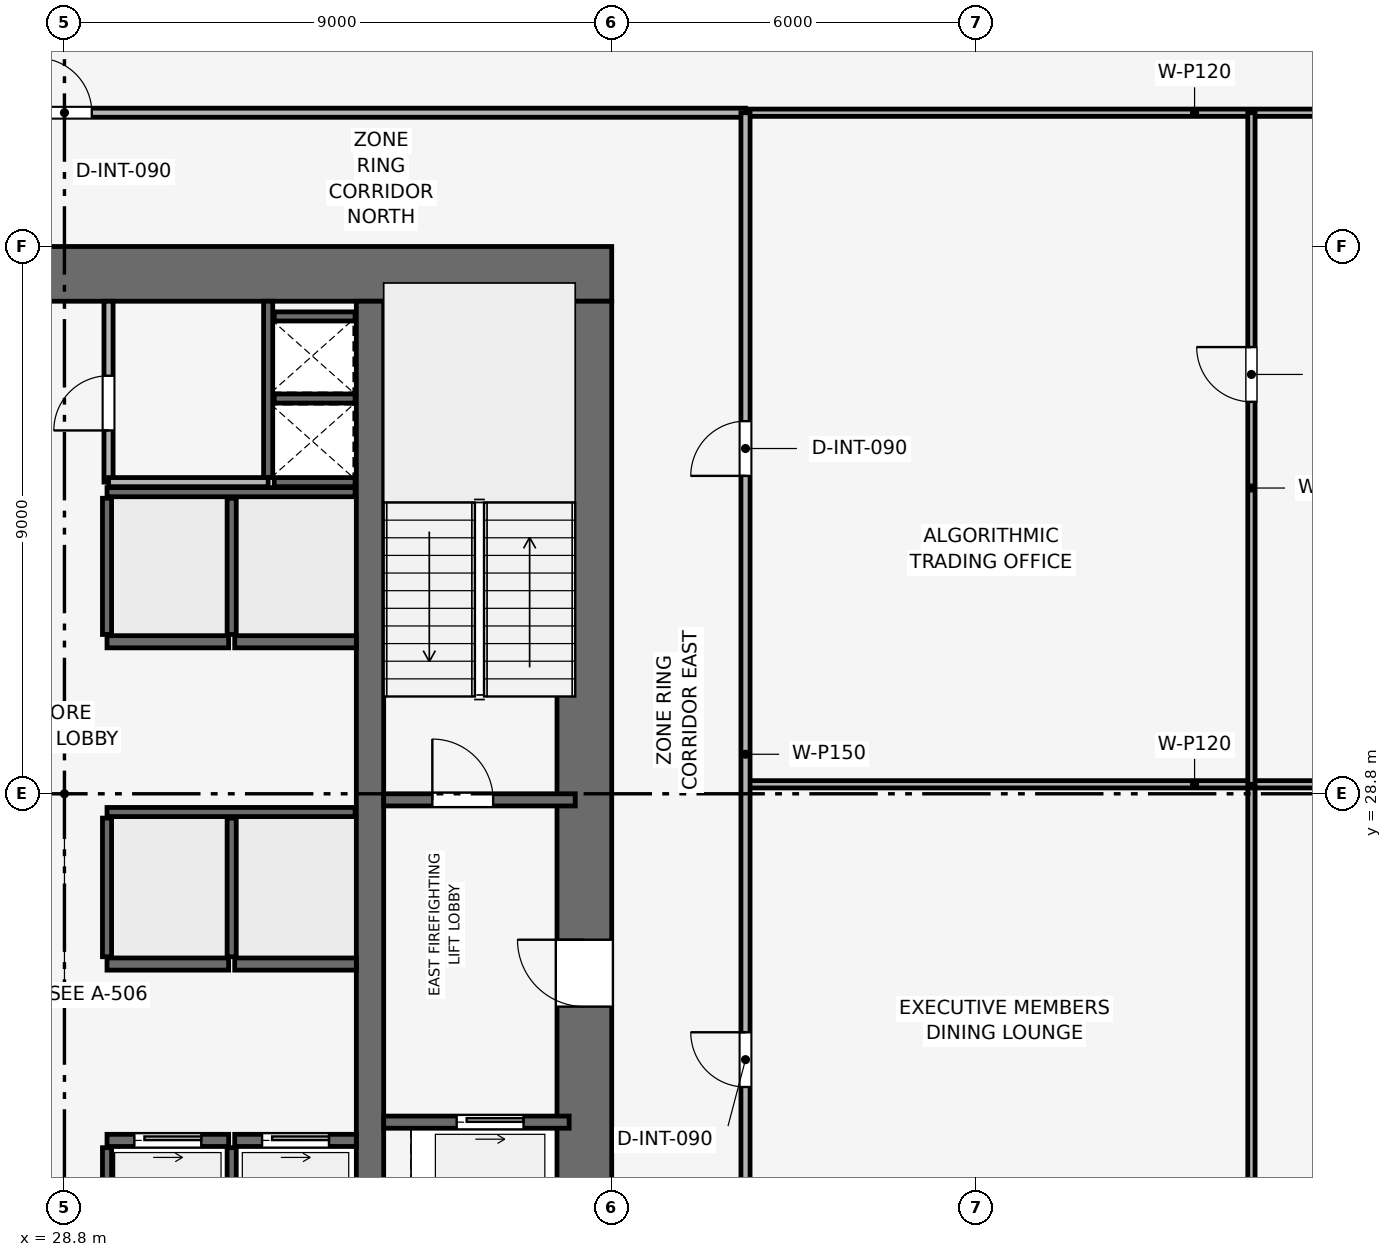
"""IFC4 building model, lengths in metres.
Left out: names, types, materials, properties, quantities, classifications, styles, units other than length and angle.
Written with IfcOpenShell. Run it as: python <this file> out.ifc"""

import sys

from ifc_helpers import new_model, si_unit, direction, frame, frame_2d, origin, place, context, subcontext, project, spatial, rectangle, extrude, element, fill, save


model = new_model("IFC4")
c1 = context("Model", 3, precision=1e-05, world=origin(), true_north=direction((0.0, 1.0)))
c2 = subcontext(c1, "Body", "Model", "MODEL_VIEW")
j1 = project(units=[si_unit("LENGTHUNIT", "METRE"), si_unit("PLANEANGLEUNIT", "RADIAN")], contexts=[c1])
p1 = place(None, origin())
s1 = spatial("IfcSite", under=j1, at=p1, CompositionType="ELEMENT")
p2 = place(p1, origin())
s2 = spatial("IfcBuilding", under=s1, at=p2, CompositionType="ELEMENT")
p3 = place(p2, frame((0.0, 0.0, 121.2)))
s3 = spatial("IfcBuildingStorey", under=s2, at=p3, CompositionType="ELEMENT", Elevation=121.2)
p4 = place(p3, frame((19.8, 37.35, 0.0), z_axis=(0.0, 0.0, 1.0), x_axis=(1.0, 0.0, 0.0)))
e1 = element("IfcWall", 1, at=p4, inside=s3, PredefinedType="SHEAR", context=c2, shape_type="SweptSolid", body=[
    extrude(rectangle(XDim=18.0, YDim=0.9, at=frame_2d((9.0, 0.0))), origin(), (0.0, 0.0, 1.0), 3.9),
])
p5 = place(p4, frame((7.05, 0.0, 0.0)))
e2 = element("IfcOpeningElement", 2, at=p5, cuts=e1, PredefinedType="OPENING", context=c2, shape_type="SweptSolid", body=[
    extrude(rectangle(XDim=1.1, YDim=2.15, at=frame_2d((0.55, 1.075))), frame((0.0, 0.46, 0.0), z_axis=(0.0, -1.0, 0.0), x_axis=(1.0, 0.0, 0.0)), (0.0, 0.0, 1.0), 0.92),
])
p6 = place(p3, frame((37.35, 20.7, 0.0), z_axis=(0.0, 0.0, 1.0), x_axis=(0.0, 1.0, 0.0)))
e3 = element("IfcWall", 3, at=p6, inside=s3, PredefinedType="SHEAR", context=c2, shape_type="SweptSolid", body=[
    extrude(rectangle(XDim=16.2, YDim=0.9, at=frame_2d((8.1, 0.0))), origin(), (0.0, 0.0, 1.0), 3.9),
])
p7 = place(p6, frame((4.6, 0.0, 0.0)))
e4 = element("IfcOpeningElement", 4, at=p7, cuts=e3, PredefinedType="OPENING", context=c2, shape_type="SweptSolid", body=[
    extrude(rectangle(XDim=1.1, YDim=2.15, at=frame_2d((0.55, 1.075))), frame((0.0, 0.46, 0.0), z_axis=(0.0, -1.0, 0.0), x_axis=(1.0, 0.0, 0.0)), (0.0, 0.0, 1.0), 0.92),
])
p8 = place(p3, frame((33.825, 20.7, 0.0), z_axis=(0.0, 0.0, 1.0), x_axis=(0.0, 1.0, 0.0)))
e5 = element("IfcWall", 5, at=p8, inside=s3, PredefinedType="SHEAR", context=c2, shape_type="SweptSolid", body=[
    extrude(rectangle(XDim=16.2, YDim=0.45, at=frame_2d((8.1, 0.0))), origin(), (0.0, 0.0, 1.0), 3.9),
])
p9 = place(p3, frame((34.05, 28.7, 0.0), z_axis=(0.0, 0.0, 1.0), x_axis=(1.0, 0.0, 0.0)))
e6 = element("IfcWall", 6, at=p9, inside=s3, PredefinedType="SHEAR", context=c2, shape_type="SweptSolid", body=[
    extrude(rectangle(XDim=3.15, YDim=0.2, at=frame_2d((1.575, 0.0))), origin(), (0.0, 0.0, 1.0), 3.65),
])
p10 = place(p9, frame((0.8, 0.0, 0.0)))
e7 = element("IfcOpeningElement", 7, at=p10, cuts=e6, PredefinedType="OPENING", context=c2, shape_type="SweptSolid", body=[
    extrude(rectangle(XDim=1.0, YDim=2.1, at=frame_2d((0.5, 1.05))), frame((0.0, 0.11, 0.0), z_axis=(0.0, -1.0, 0.0), x_axis=(1.0, 0.0, 0.0)), (0.0, 0.0, 1.0), 0.22),
])
p11 = place(p3, frame((32.15, 34.0, 0.0), z_axis=(0.0, 0.0, 1.0), x_axis=(0.0, 1.0, 0.0)))
e8 = element("IfcWall", 8, at=p11, inside=s3, PredefinedType="SHEAR", context=c2, shape_type="SweptSolid", body=[
    extrude(rectangle(XDim=2.9, YDim=0.15, at=frame_2d((1.45, 0.0))), origin(), (0.0, 0.0, 1.0), 3.65),
])
for number, where, z_axis, x_axis in (
    (9, (32.25, 33.925, 0.0), (0.0, 0.0, 1.0), (1.0, 0.0, 0.0)),
    (10, (32.25, 35.3, 0.0), (0.0, 0.0, 1.0), (1.0, 0.0, 0.0)),
):
    element("IfcWall", number, at=place(p3, frame(where, z_axis=z_axis, x_axis=x_axis)), inside=s3, PredefinedType="SHEAR", context=c2, shape_type="SweptSolid", body=[
        extrude(rectangle(XDim=1.33, YDim=0.15, at=frame_2d((0.665, 0.0))), origin(), (0.0, 0.0, 1.0), 3.65),
    ])
p12 = place(p3, frame((34.05, 23.4, 0.0), z_axis=(0.0, 0.0, 1.0), x_axis=(1.0, 0.0, 0.0)))
e11 = element("IfcWall", 11, at=p12, inside=s3, PredefinedType="SHEAR", context=c2, shape_type="SweptSolid", body=[
    extrude(rectangle(XDim=3.05, YDim=0.2, at=frame_2d((1.525, 0.0))), origin(), (0.0, 0.0, 1.0), 3.65),
])
p13 = place(p12, frame((1.2, 0.0, 0.0)))
e12 = element("IfcOpeningElement", 12, at=p13, cuts=e11, PredefinedType="OPENING", context=c2, shape_type="SweptSolid", body=[
    extrude(rectangle(XDim=1.1, YDim=2.15, at=frame_2d((0.55, 1.075))), frame((0.0, 0.11, 0.0), z_axis=(0.0, -1.0, 0.0), x_axis=(1.0, 0.0, 0.0)), (0.0, 0.0, 1.0), 0.22),
])
p14 = place(p3, frame((29.5, 23.1, 0.0), z_axis=(0.0, 0.0, 1.0), x_axis=(1.0, 0.0, 0.0)))
e13 = element("IfcWall", 13, at=p14, inside=s3, PredefinedType="SHEAR", context=c2, shape_type="SweptSolid", body=[
    extrude(rectangle(XDim=2.0, YDim=0.2, at=frame_2d((1.0, 0.0))), origin(), (0.0, 0.0, 1.0), 3.65),
])
p15 = place(p14, frame((0.45, 0.0, 0.0)))
e14 = element("IfcOpeningElement", 14, at=p15, cuts=e13, PredefinedType="OPENING", context=c2, shape_type="SweptSolid", body=[
    extrude(rectangle(XDim=1.1, YDim=2.15, at=frame_2d((0.55, 1.075))), frame((0.0, 0.11, 0.0), z_axis=(0.0, -1.0, 0.0), x_axis=(1.0, 0.0, 0.0)), (0.0, 0.0, 1.0), 0.22),
])
p16 = place(p3, frame((31.6, 23.1, 0.0), z_axis=(0.0, 0.0, 1.0), x_axis=(1.0, 0.0, 0.0)))
e15 = element("IfcWall", 15, at=p16, inside=s3, PredefinedType="SHEAR", context=c2, shape_type="SweptSolid", body=[
    extrude(rectangle(XDim=2.0, YDim=0.2, at=frame_2d((1.0, 0.0))), origin(), (0.0, 0.0, 1.0), 3.65),
])
p17 = place(p16, frame((0.45, 0.0, 0.0)))
e16 = element("IfcOpeningElement", 16, at=p17, cuts=e15, PredefinedType="OPENING", context=c2, shape_type="SweptSolid", body=[
    extrude(rectangle(XDim=1.1, YDim=2.15, at=frame_2d((0.55, 1.075))), frame((0.0, 0.11, 0.0), z_axis=(0.0, -1.0, 0.0), x_axis=(1.0, 0.0, 0.0)), (0.0, 0.0, 1.0), 0.22),
])
for number, where, z_axis, x_axis in (
    (17, (29.5, 26.0, 0.0), (0.0, 0.0, 1.0), (1.0, 0.0, 0.0)),
    (18, (31.6, 26.0, 0.0), (0.0, 0.0, 1.0), (1.0, 0.0, 0.0)),
    (19, (29.5, 31.3, 0.0), (0.0, 0.0, 1.0), (1.0, 0.0, 0.0)),
    (20, (31.6, 31.3, 0.0), (0.0, 0.0, 1.0), (1.0, 0.0, 0.0)),
):
    element("IfcWall", number, at=place(p3, frame(where, z_axis=z_axis, x_axis=x_axis)), inside=s3, PredefinedType="SHEAR", context=c2, shape_type="SweptSolid", body=[
        extrude(rectangle(XDim=2.0, YDim=0.2, at=frame_2d((1.0, 0.0))), origin(), (0.0, 0.0, 1.0), 3.65),
    ])
p18 = place(p3, frame((32.25, 36.65, 0.0), z_axis=(0.0, 0.0, 1.0), x_axis=(1.0, 0.0, 0.0)))
e21 = element("IfcWall", 21, at=p18, inside=s3, PredefinedType="SHEAR", context=c2, shape_type="SweptSolid", body=[
    extrude(rectangle(XDim=1.33, YDim=0.15, at=frame_2d((0.665, 0.0))), origin(), (0.0, 0.0, 1.0), 3.65),
])
for number, where, z_axis, x_axis in (
    (22, (29.5, 20.72, 0.0), (0.0, 0.0, 1.0), (0.0, 1.0, 0.0)),
    (23, (31.55, 20.72, 0.0), (0.0, 0.0, 1.0), (0.0, 1.0, 0.0)),
):
    element("IfcWall", number, at=place(p3, frame(where, z_axis=z_axis, x_axis=x_axis)), inside=s3, PredefinedType="SHEAR", context=c2, shape_type="SweptSolid", body=[
        extrude(rectangle(XDim=2.26, YDim=0.15, at=frame_2d((1.13, 0.0))), origin(), (0.0, 0.0, 1.0), 3.65),
    ])
p19 = place(p3, frame((29.5, 28.5, 0.0), z_axis=(0.0, 0.0, 1.0), x_axis=(1.0, 0.0, 0.0)))
e24 = element("IfcWall", 24, at=p19, inside=s3, PredefinedType="SHEAR", context=c2, shape_type="SweptSolid", body=[
    extrude(rectangle(XDim=4.08, YDim=0.15, at=frame_2d((2.04, 0.0))), origin(), (0.0, 0.0, 1.0), 3.65),
])
for number, where, z_axis, x_axis in (
    (25, (29.5, 26.12, 0.0), (0.0, 0.0, 1.0), (0.0, 1.0, 0.0)),
    (26, (31.55, 26.12, 0.0), (0.0, 0.0, 1.0), (0.0, 1.0, 0.0)),
):
    element("IfcWall", number, at=place(p3, frame(where, z_axis=z_axis, x_axis=x_axis)), inside=s3, PredefinedType="SHEAR", context=c2, shape_type="SweptSolid", body=[
        extrude(rectangle(XDim=2.28, YDim=0.15, at=frame_2d((1.14, 0.0))), origin(), (0.0, 0.0, 1.0), 3.65),
    ])
p20 = place(p3, frame((29.5, 33.76, 0.0), z_axis=(0.0, 0.0, 1.0), x_axis=(1.0, 0.0, 0.0)))
e27 = element("IfcWall", 27, at=p20, inside=s3, PredefinedType="SHEAR", context=c2, shape_type="SweptSolid", body=[
    extrude(rectangle(XDim=4.08, YDim=0.15, at=frame_2d((2.04, 0.0))), origin(), (0.0, 0.0, 1.0), 3.65),
])
for number, where, z_axis, x_axis in (
    (28, (29.5, 31.42, 0.0), (0.0, 0.0, 1.0), (0.0, 1.0, 0.0)),
    (29, (31.55, 31.42, 0.0), (0.0, 0.0, 1.0), (0.0, 1.0, 0.0)),
):
    element("IfcWall", number, at=place(p3, frame(where, z_axis=z_axis, x_axis=x_axis)), inside=s3, PredefinedType="SHEAR", context=c2, shape_type="SweptSolid", body=[
        extrude(rectangle(XDim=2.24, YDim=0.15, at=frame_2d((1.12, 0.0))), origin(), (0.0, 0.0, 1.0), 3.65),
    ])
p21 = place(p3, frame((29.525, 33.925, 0.0), z_axis=(0.0, 0.0, 1.0), x_axis=(0.0, 1.0, 0.0)))
e30 = element("IfcWall", 30, at=p21, inside=s3, PredefinedType="PARTITIONING", context=c2, shape_type="SweptSolid", body=[
    extrude(rectangle(XDim=2.975, YDim=0.15, at=frame_2d((1.487, 0.0))), origin(), (0.0, 0.0, 1.0), 3.65),
])
p22 = place(p21, frame((0.85, 0.0, 0.0)))
e31 = element("IfcOpeningElement", 31, at=p22, cuts=e30, PredefinedType="OPENING", context=c2, shape_type="SweptSolid", body=[
    extrude(rectangle(XDim=0.9, YDim=2.1, at=frame_2d((0.45, 1.05))), frame((0.0, 0.085, 0.0), z_axis=(0.0, -1.0, 0.0), x_axis=(1.0, 0.0, 0.0)), (0.0, 0.0, 1.0), 0.17),
])
p23 = place(p3, frame((29.525, 33.925, 0.0), z_axis=(0.0, 0.0, 1.0), x_axis=(1.0, 0.0, 0.0)))
e32 = element("IfcWall", 32, at=p23, inside=s3, PredefinedType="PARTITIONING", context=c2, shape_type="SweptSolid", body=[
    extrude(rectangle(XDim=2.625, YDim=0.15, at=frame_2d((1.312, 0.0))), origin(), (0.0, 0.0, 1.0), 3.65),
])
p24 = place(p3, frame((40.0, 40.0, 0.0), z_axis=(0.0, 0.0, 1.0), x_axis=(1.0, 0.0, 0.0)))
e33 = element("IfcWall", 33, at=p24, inside=s3, PredefinedType="PARTITIONING", context=c2, shape_type="SweptSolid", body=[
    extrude(rectangle(XDim=14.77, YDim=0.12, at=frame_2d((7.385, 0.0))), origin(), (0.0, 0.0, 1.0), 3.035),
])
p25 = place(p3, frame((48.32, 19.9, 0.0), z_axis=(0.0, 0.0, 1.0), x_axis=(0.0, 1.0, 0.0)))
e34 = element("IfcWall", 34, at=p25, inside=s3, PredefinedType="PARTITIONING", context=c2, shape_type="SweptSolid", body=[
    extrude(rectangle(XDim=9.056, YDim=0.12, at=frame_2d((4.528, 0.0))), origin(), (0.0, 0.0, 1.0), 3.185),
])
p26 = place(p25, frame((1.493, 0.0, 0.0)))
e35 = element("IfcOpeningElement", 35, at=p26, cuts=e34, PredefinedType="OPENING", context=c2, shape_type="SweptSolid", body=[
    extrude(rectangle(XDim=0.9, YDim=2.1, at=frame_2d((0.45, 1.05))), frame((0.0, 0.07, 0.0), z_axis=(0.0, -1.0, 0.0), x_axis=(1.0, 0.0, 0.0)), (0.0, 0.0, 1.0), 0.14),
])
p27 = place(p3, frame((40.0, 28.956, 0.0), z_axis=(0.0, 0.0, 1.0), x_axis=(1.0, 0.0, 0.0)))
e36 = element("IfcWall", 36, at=p27, inside=s3, PredefinedType="PARTITIONING", context=c2, shape_type="SweptSolid", body=[
    extrude(rectangle(XDim=14.77, YDim=0.12, at=frame_2d((7.385, 0.0))), origin(), (0.0, 0.0, 1.0), 3.035),
])
p28 = place(p3, frame((48.32, 28.956, 0.0), z_axis=(0.0, 0.0, 1.0), x_axis=(0.0, 1.0, 0.0)))
e37 = element("IfcWall", 37, at=p28, inside=s3, PredefinedType="PARTITIONING", context=c2, shape_type="SweptSolid", body=[
    extrude(rectangle(XDim=11.044, YDim=0.12, at=frame_2d((5.522, 0.0))), origin(), (0.0, 0.0, 1.0), 3.185),
])
p29 = place(p28, frame((6.29, 0.0, 0.0)))
e38 = element("IfcOpeningElement", 38, at=p29, cuts=e37, PredefinedType="OPENING", context=c2, shape_type="SweptSolid", body=[
    extrude(rectangle(XDim=0.9, YDim=2.1, at=frame_2d((0.45, 1.05))), frame((0.0, 0.07, 0.0), z_axis=(0.0, -1.0, 0.0), x_axis=(1.0, 0.0, 0.0)), (0.0, 0.0, 1.0), 0.14),
])
p30 = place(p3, frame((17.6, 40.0, 0.0), z_axis=(0.0, 0.0, 1.0), x_axis=(1.0, 0.0, 0.0)))
e39 = element("IfcWall", 39, at=p30, inside=s3, PredefinedType="PARTITIONING", context=c2, shape_type="SweptSolid", body=[
    extrude(rectangle(XDim=22.4, YDim=0.15, at=frame_2d((11.2, 0.0))), origin(), (0.0, 0.0, 1.0), 3.185),
])
p31 = place(p30, frame((10.75, 0.0, 0.0)))
e40 = element("IfcOpeningElement", 40, at=p31, cuts=e39, PredefinedType="OPENING", context=c2, shape_type="SweptSolid", body=[
    extrude(rectangle(XDim=0.9, YDim=2.1, at=frame_2d((0.45, 1.05))), frame((0.0, 0.085, 0.0), z_axis=(0.0, -1.0, 0.0), x_axis=(1.0, 0.0, 0.0)), (0.0, 0.0, 1.0), 0.17),
])
p32 = place(p3, frame((40.0, 17.6, 0.0), z_axis=(0.0, 0.0, 1.0), x_axis=(0.0, 1.0, 0.0)))
e41 = element("IfcWall", 41, at=p32, inside=s3, PredefinedType="PARTITIONING", context=c2, shape_type="SweptSolid", body=[
    extrude(rectangle(XDim=22.4, YDim=0.15, at=frame_2d((11.2, 0.0))), origin(), (0.0, 0.0, 1.0), 3.185),
])
p33 = place(p32, frame((0.7, 0.0, 0.0)))
e42 = element("IfcOpeningElement", 42, at=p33, cuts=e41, PredefinedType="OPENING", context=c2, shape_type="SweptSolid", body=[
    extrude(rectangle(XDim=0.9, YDim=2.1, at=frame_2d((0.45, 1.05))), frame((0.0, 0.085, 0.0), z_axis=(0.0, -1.0, 0.0), x_axis=(1.0, 0.0, 0.0)), (0.0, 0.0, 1.0), 0.17),
])
p34 = place(p32, frame((6.378, 0.0, 0.0)))
e43 = element("IfcOpeningElement", 43, at=p34, cuts=e41, PredefinedType="OPENING", context=c2, shape_type="SweptSolid", body=[
    extrude(rectangle(XDim=0.9, YDim=2.1, at=frame_2d((0.45, 1.05))), frame((0.0, 0.085, 0.0), z_axis=(0.0, -1.0, 0.0), x_axis=(1.0, 0.0, 0.0)), (0.0, 0.0, 1.0), 0.17),
])
p35 = place(p32, frame((16.428, 0.0, 0.0)))
e44 = element("IfcOpeningElement", 44, at=p35, cuts=e41, PredefinedType="OPENING", context=c2, shape_type="SweptSolid", body=[
    extrude(rectangle(XDim=0.9, YDim=2.1, at=frame_2d((0.45, 1.05))), frame((0.0, 0.085, 0.0), z_axis=(0.0, -1.0, 0.0), x_axis=(1.0, 0.0, 0.0)), (0.0, 0.0, 1.0), 0.17),
])
p36 = place(p10, origin())
e45 = element("IfcDoor", 45, at=p36, inside=s3, OperationType="SINGLE_SWING_LEFT", PredefinedType="DOOR", context=c2, shape_type="SweptSolid", body=[
    extrude(rectangle(XDim=1.0, YDim=2.1, at=frame_2d((0.5, 1.05))), frame((0.0, 0.025, 0.0), z_axis=(0.0, -1.0, 0.0), x_axis=(1.0, 0.0, 0.0)), (0.0, 0.0, 1.0), 0.05),
])
fill(e7, e45)
p37 = place(p13, origin())
e46 = element("IfcDoor", 46, at=p37, inside=s3, OperationType="SLIDING_TO_RIGHT", PredefinedType="DOOR", context=c2, shape_type="SweptSolid", body=[
    extrude(rectangle(XDim=1.1, YDim=2.15, at=frame_2d((0.55, 1.075))), frame((0.0, 0.025, 0.0), z_axis=(0.0, -1.0, 0.0), x_axis=(1.0, 0.0, 0.0)), (0.0, 0.0, 1.0), 0.05),
])
fill(e12, e46)
p38 = place(p15, origin())
e47 = element("IfcDoor", 47, at=p38, inside=s3, OperationType="SLIDING_TO_RIGHT", PredefinedType="DOOR", context=c2, shape_type="SweptSolid", body=[
    extrude(rectangle(XDim=1.1, YDim=2.15, at=frame_2d((0.55, 1.075))), frame((0.0, 0.025, 0.0), z_axis=(0.0, -1.0, 0.0), x_axis=(1.0, 0.0, 0.0)), (0.0, 0.0, 1.0), 0.05),
])
fill(e14, e47)
p39 = place(p17, origin())
e48 = element("IfcDoor", 48, at=p39, inside=s3, OperationType="SLIDING_TO_RIGHT", PredefinedType="DOOR", context=c2, shape_type="SweptSolid", body=[
    extrude(rectangle(XDim=1.1, YDim=2.15, at=frame_2d((0.55, 1.075))), frame((0.0, 0.025, 0.0), z_axis=(0.0, -1.0, 0.0), x_axis=(1.0, 0.0, 0.0)), (0.0, 0.0, 1.0), 0.05),
])
fill(e16, e48)
p40 = place(p22, origin())
e49 = element("IfcDoor", 49, at=p40, inside=s3, OperationType="SINGLE_SWING_LEFT", PredefinedType="DOOR", context=c2, shape_type="SweptSolid", body=[
    extrude(rectangle(XDim=0.9, YDim=2.1, at=frame_2d((0.45, 1.05))), frame((0.0, 0.025, 0.0), z_axis=(0.0, -1.0, 0.0), x_axis=(1.0, 0.0, 0.0)), (0.0, 0.0, 1.0), 0.05),
])
fill(e31, e49)
p41 = place(p29, origin())
e50 = element("IfcDoor", 50, at=p41, inside=s3, OperationType="SINGLE_SWING_RIGHT", PredefinedType="DOOR", context=c2, shape_type="SweptSolid", body=[
    extrude(rectangle(XDim=0.9, YDim=2.1, at=frame_2d((0.45, 1.05))), frame((0.0, 0.025, 0.0), z_axis=(0.0, -1.0, 0.0), x_axis=(1.0, 0.0, 0.0)), (0.0, 0.0, 1.0), 0.05),
])
fill(e38, e50)
p42 = place(p31, origin())
e51 = element("IfcDoor", 51, at=p42, inside=s3, OperationType="SINGLE_SWING_LEFT", PredefinedType="DOOR", context=c2, shape_type="SweptSolid", body=[
    extrude(rectangle(XDim=0.9, YDim=2.1, at=frame_2d((0.45, 1.05))), frame((0.0, 0.025, 0.0), z_axis=(0.0, -1.0, 0.0), x_axis=(1.0, 0.0, 0.0)), (0.0, 0.0, 1.0), 0.05),
])
fill(e40, e51)
p43 = place(p34, origin())
e52 = element("IfcDoor", 52, at=p43, inside=s3, OperationType="SINGLE_SWING_RIGHT", PredefinedType="DOOR", context=c2, shape_type="SweptSolid", body=[
    extrude(rectangle(XDim=0.9, YDim=2.1, at=frame_2d((0.45, 1.05))), frame((0.0, 0.025, 0.0), z_axis=(0.0, -1.0, 0.0), x_axis=(1.0, 0.0, 0.0)), (0.0, 0.0, 1.0), 0.05),
])
fill(e43, e52)
p44 = place(p35, origin())
e53 = element("IfcDoor", 53, at=p44, inside=s3, OperationType="SINGLE_SWING_LEFT", PredefinedType="DOOR", context=c2, shape_type="SweptSolid", body=[
    extrude(rectangle(XDim=0.9, YDim=2.1, at=frame_2d((0.45, 1.05))), frame((0.0, 0.025, 0.0), z_axis=(0.0, -1.0, 0.0), x_axis=(1.0, 0.0, 0.0)), (0.0, 0.0, 1.0), 0.05),
])
fill(e44, e53)
p45 = place(p7, origin())
e54 = element("IfcDoor", 54, at=p45, inside=s3, OperationType="SINGLE_SWING_RIGHT", PredefinedType="DOOR", context=c2, shape_type="SweptSolid", body=[
    extrude(rectangle(XDim=1.1, YDim=2.15, at=frame_2d((0.55, 1.075))), frame((0.0, 0.025, 0.0), z_axis=(0.0, -1.0, 0.0), x_axis=(1.0, 0.0, 0.0)), (0.0, 0.0, 1.0), 0.05),
])
fill(e4, e54)
save(model, sys.argv[1])
